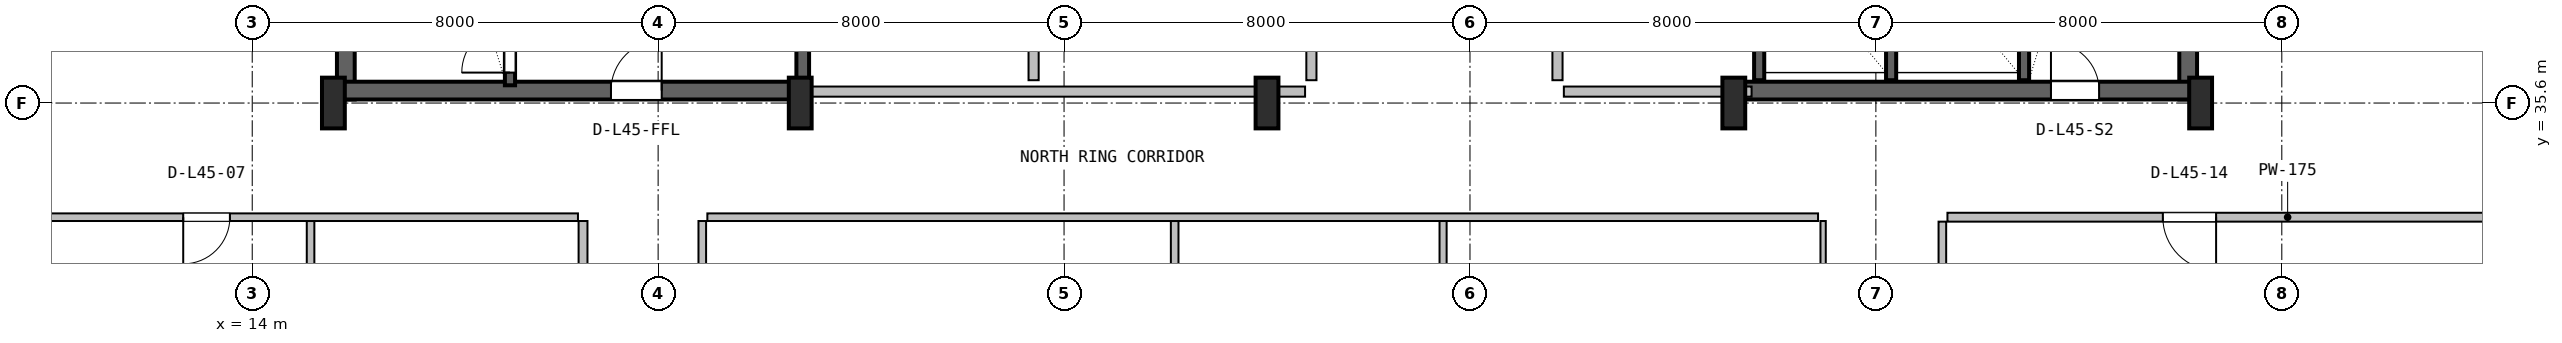
"""IFC4 building model, lengths in metres.
Left out: names, types, materials, properties, quantities, classifications, styles, units other than length and angle.
Written with IfcOpenShell. Run it as: python <this file> out.ifc"""

import sys

from ifc_helpers import new_model, si_unit, direction, frame, frame_2d, origin, origin_2d, place, context, subcontext, project, spatial, rectangle, i_section, extrude, source, transform, mapped, element, fill, save


model = new_model("IFC4")
c1 = context("Model", 3, precision=1e-05, world=origin(), true_north=direction((0.0, 1.0)))
c2 = subcontext(c1, "Body", "Model", "MODEL_VIEW")
j1 = project(units=[si_unit("LENGTHUNIT", "METRE"), si_unit("PLANEANGLEUNIT", "RADIAN")], contexts=[c1])
p1 = place(None, origin())
s1 = spatial("IfcSite", under=j1, at=p1, CompositionType="ELEMENT")
p2 = place(p1, origin())
s2 = spatial("IfcBuilding", under=s1, at=p2, CompositionType="ELEMENT")
p3 = place(p2, frame((0.0, 0.0, 183.8)))
s3 = spatial("IfcBuildingStorey", under=s2, at=p3, CompositionType="ELEMENT", Elevation=183.8)
for number, where, z_axis, x_axis in (
    (1, (15.845, 35.67, 0.0), (0.0, 0.0, 1.0), (0.0, 1.0, 0.0)),
    (2, (52.155, 35.67, 0.0), (0.0, 0.0, 1.0), (0.0, 1.0, 0.0)),
):
    element("IfcWall", number, at=place(p3, frame(where, z_axis=z_axis, x_axis=x_axis)), inside=s3, PredefinedType="SHEAR", context=c2, shape_type="SweptSolid", body=[
        extrude(rectangle(XDim=11.13, YDim=0.35, at=frame_2d((5.565, 0.0))), origin(), (0.0, 0.0, 1.0), 3.55),
    ])
p4 = place(p3, frame((15.67, 35.845, 0.0), z_axis=(0.0, 0.0, 1.0), x_axis=(1.0, 0.0, 0.0)))
e3 = element("IfcWall", 3, at=p4, inside=s3, PredefinedType="SHEAR", context=c2, shape_type="SweptSolid", body=[
    extrude(rectangle(XDim=9.13, YDim=0.35, at=frame_2d((4.565, 0.0))), origin(), (0.0, 0.0, 1.0), 3.55),
])
p5 = place(p4, frame((5.4, 0.0, 0.0)))
e4 = element("IfcOpeningElement", 4, at=p5, cuts=e3, PredefinedType="OPENING", context=c2, shape_type="SweptSolid", body=[
    extrude(rectangle(XDim=1.0, YDim=2.1, at=frame_2d((0.5, 1.05))), frame((0.0, 0.185, 0.0), z_axis=(0.0, -1.0, 0.0), x_axis=(1.0, 0.0, 0.0)), (0.0, 0.0, 1.0), 0.37),
])
p6 = place(p3, frame((43.2, 35.845, 0.0), z_axis=(0.0, 0.0, 1.0), x_axis=(1.0, 0.0, 0.0)))
e5 = element("IfcWall", 5, at=p6, inside=s3, PredefinedType="SHEAR", context=c2, shape_type="SweptSolid", body=[
    extrude(rectangle(XDim=9.13, YDim=0.35, at=frame_2d((4.565, 0.0))), origin(), (0.0, 0.0, 1.0), 3.55),
])
p7 = place(p6, frame((6.25, 0.0, 0.0)))
e6 = element("IfcOpeningElement", 6, at=p7, cuts=e5, PredefinedType="OPENING", context=c2, shape_type="SweptSolid", body=[
    extrude(rectangle(XDim=0.95, YDim=2.1, at=frame_2d((0.475, 1.05))), frame((0.0, 0.185, 0.0), z_axis=(0.0, -1.0, 0.0), x_axis=(1.0, 0.0, 0.0)), (0.0, 0.0, 1.0), 0.37),
])
m1 = source(origin(), c2, "Body", "SweptSolid", [
    extrude(i_section(OverallWidth=0.45, OverallDepth=1.0, WebThickness=0.016, FlangeThickness=0.03, FilletRadius=0.016, at=origin_2d()), origin(), (0.0, 0.0, 1.0), 3.8),
])
for number, where, z_axis, x_axis in (
    (7, (15.6, 35.6, 0.0), (0.0, 0.0, 1.0), (1.0, 0.0, 0.0)),
    (8, (24.8, 35.6, 0.0), (0.0, 0.0, 1.0), (1.0, 0.0, 0.0)),
    (9, (34.0, 35.6, 0.0), (0.0, 0.0, 1.0), (1.0, 0.0, 0.0)),
    (10, (43.2, 35.6, 0.0), (0.0, 0.0, 1.0), (1.0, 0.0, 0.0)),
    (11, (52.4, 35.6, 0.0), (0.0, 0.0, 1.0), (1.0, 0.0, 0.0)),
):
    element("IfcColumn", number, at=place(p3, frame(where, z_axis=z_axis, x_axis=x_axis)), inside=s3, PredefinedType="COLUMN", context=c2, shape_type="MappedRepresentation", body=[
        mapped(m1, transform((0.0, 0.0, 0.0), x_axis=(1.0, 0.0, 0.0), y_axis=(0.0, 1.0, 0.0), z_axis=(0.0, 0.0, 1.0), scale=1.0)),
    ])
p8 = place(p3, frame((19.08, 35.95, 0.0), z_axis=(0.0, 0.0, 1.0), x_axis=(0.0, 1.0, 0.0)))
e12 = element("IfcWall", 12, at=p8, inside=s3, PredefinedType="SHEAR", context=c2, shape_type="SweptSolid", body=[
    extrude(rectangle(XDim=9.65, YDim=0.2, at=frame_2d((4.825, 0.0))), origin(), (0.0, 0.0, 1.0), 3.55),
])
p9 = place(p8, frame((0.25, 0.0, 0.0)))
e13 = element("IfcOpeningElement", 13, at=p9, cuts=e12, PredefinedType="OPENING", context=c2, shape_type="SweptSolid", body=[
    extrude(rectangle(XDim=0.95, YDim=2.1, at=frame_2d((0.475, 1.05))), frame((0.0, 0.11, 0.0), z_axis=(0.0, -1.0, 0.0), x_axis=(1.0, 0.0, 0.0)), (0.0, 0.0, 1.0), 0.22),
])
p10 = place(p3, frame((24.85, 36.05, 0.0), z_axis=(0.0, 0.0, 1.0), x_axis=(0.0, 1.0, 0.0)))
e14 = element("IfcWall", 14, at=p10, inside=s3, PredefinedType="SHEAR", context=c2, shape_type="SweptSolid", body=[
    extrude(rectangle(XDim=10.45, YDim=0.25, at=frame_2d((5.225, 0.0))), origin(), (0.0, 0.0, 1.0), 3.55),
])
p11 = place(p3, frame((48.92, 36.05, 0.0), z_axis=(0.0, 0.0, 1.0), x_axis=(0.0, 1.0, 0.0)))
e15 = element("IfcWall", 15, at=p11, inside=s3, PredefinedType="SHEAR", context=c2, shape_type="SweptSolid", body=[
    extrude(rectangle(XDim=10.5, YDim=0.2, at=frame_2d((5.25, 0.0))), origin(), (0.0, 0.0, 1.0), 3.55),
])
for number, where, z_axis, x_axis in (
    (16, (43.7, 36.05, 0.0), (0.0, 0.0, 1.0), (0.0, 1.0, 0.0)),
    (17, (46.3, 36.05, 0.0), (0.0, 0.0, 1.0), (0.0, 1.0, 0.0)),
):
    element("IfcWall", number, at=place(p3, frame(where, z_axis=z_axis, x_axis=x_axis)), inside=s3, PredefinedType="SHEAR", context=c2, shape_type="SweptSolid", body=[
        extrude(rectangle(XDim=3.05, YDim=0.2, at=frame_2d((1.525, 0.0))), origin(), (0.0, 0.0, 1.0), 3.55),
    ])
p12 = place(p3, frame((25.0, 35.825, 0.0), z_axis=(0.0, 0.0, 1.0), x_axis=(1.0, 0.0, 0.0)))
e18 = element("IfcWall", 18, at=p12, inside=s3, PredefinedType="PLUMBINGWALL", context=c2, shape_type="SweptSolid", body=[
    extrude(rectangle(XDim=9.75, YDim=0.2, at=frame_2d((4.875, 0.0))), origin(), (0.0, 0.0, 1.0), 2.575),
])
for number, where, z_axis, x_axis in (
    (19, (29.4, 36.05, 0.0), (0.0, 0.0, 1.0), (0.0, 1.0, 0.0)),
    (20, (34.875, 36.05, 0.0), (0.0, 0.0, 1.0), (0.0, 1.0, 0.0)),
):
    element("IfcWall", number, at=place(p3, frame(where, z_axis=z_axis, x_axis=x_axis)), inside=s3, PredefinedType="PLUMBINGWALL", context=c2, shape_type="SweptSolid", body=[
        extrude(rectangle(XDim=3.1, YDim=0.2, at=frame_2d((1.55, 0.0))), origin(), (0.0, 0.0, 1.0), 3.53),
    ])
p13 = place(p3, frame((39.85, 35.825, 0.0), z_axis=(0.0, 0.0, 1.0), x_axis=(1.0, 0.0, 0.0)))
e21 = element("IfcWall", 21, at=p13, inside=s3, PredefinedType="SOLIDWALL", context=c2, shape_type="SweptSolid", body=[
    extrude(rectangle(XDim=3.7, YDim=0.2, at=frame_2d((1.85, 0.0))), origin(), (0.0, 0.0, 1.0), 2.575),
])
p14 = place(p3, frame((39.725, 36.05, 0.0), z_axis=(0.0, 0.0, 1.0), x_axis=(0.0, 1.0, 0.0)))
e22 = element("IfcWall", 22, at=p14, inside=s3, PredefinedType="SOLIDWALL", context=c2, shape_type="SweptSolid", body=[
    extrude(rectangle(XDim=3.1, YDim=0.2, at=frame_2d((1.55, 0.0))), origin(), (0.0, 0.0, 1.0), 3.53),
])
p15 = place(p3, frame((15.15, 15.7, 0.0), z_axis=(0.0, 0.0, 1.0), x_axis=(0.0, 1.0, 0.0)))
e23 = element("IfcWall", 23, at=p15, inside=s3, PredefinedType="PARTITIONING", context=c2, shape_type="SweptSolid", body=[
    extrude(rectangle(XDim=17.575, YDim=0.15, at=frame_2d((8.788, 0.0))), origin(), (0.0, 0.0, 1.0), 3.222),
])
p16 = place(p3, frame((7.18, 33.35, 0.0), z_axis=(0.0, 0.0, 1.0), x_axis=(1.0, 0.0, 0.0)))
e24 = element("IfcWall", 24, at=p16, inside=s3, PredefinedType="PARTITIONING", context=c2, shape_type="SweptSolid", body=[
    extrude(rectangle(XDim=13.24, YDim=0.15, at=frame_2d((6.62, 0.0))), origin(), (0.0, 0.0, 1.0), 3.108),
])
p17 = place(p16, frame((5.46, 0.0, 0.0)))
e25 = element("IfcOpeningElement", 25, at=p17, cuts=e24, PredefinedType="OPENING", context=c2, shape_type="SweptSolid", body=[
    extrude(rectangle(XDim=0.92, YDim=2.08, at=frame_2d((0.46, 1.04))), frame((0.0, 0.085, 0.0), z_axis=(0.0, -1.0, 0.0), x_axis=(1.0, 0.0, 0.0)), (0.0, 0.0, 1.0), 0.17),
])
p18 = place(p3, frame((20.52, 15.7, 0.0), z_axis=(0.0, 0.0, 1.0), x_axis=(0.0, 1.0, 0.0)))
e26 = element("IfcWall", 26, at=p18, inside=s3, PredefinedType="PARTITIONING", context=c2, shape_type="SweptSolid", body=[
    extrude(rectangle(XDim=17.575, YDim=0.175, at=frame_2d((8.788, 0.0))), origin(), (0.0, 0.0, 1.0), 3.222),
])
p19 = place(p18, frame((8.265, 0.0, 0.0)))
e27 = element("IfcOpeningElement", 27, at=p19, cuts=e26, PredefinedType="OPENING", context=c2, shape_type="SweptSolid", body=[
    extrude(rectangle(XDim=1.05, YDim=2.1, at=frame_2d((0.525, 1.05))), frame((0.0, 0.098, 0.0), z_axis=(0.0, -1.0, 0.0), x_axis=(1.0, 0.0, 0.0)), (0.0, 0.0, 1.0), 0.195),
])
p20 = place(p3, frame((32.18, 18.055, 0.0), z_axis=(0.0, 0.0, 1.0), x_axis=(0.0, 1.0, 0.0)))
e28 = element("IfcWall", 28, at=p20, inside=s3, PredefinedType="PARTITIONING", context=c2, shape_type="SweptSolid", body=[
    extrude(rectangle(XDim=15.22, YDim=0.15, at=frame_2d((7.61, 0.0))), origin(), (0.0, 0.0, 1.0), 2.909),
])
p21 = place(p3, frame((22.97, 33.35, 0.0), z_axis=(0.0, 0.0, 1.0), x_axis=(1.0, 0.0, 0.0)))
e29 = element("IfcWall", 29, at=p21, inside=s3, PredefinedType="PARTITIONING", context=c2, shape_type="SweptSolid", body=[
    extrude(rectangle(XDim=21.89, YDim=0.15, at=frame_2d((10.945, 0.0))), origin(), (0.0, 0.0, 1.0), 2.909),
])
p22 = place(p3, frame((22.87, 18.055, 0.0), z_axis=(0.0, 0.0, 1.0), x_axis=(0.0, 1.0, 0.0)))
e30 = element("IfcWall", 30, at=p22, inside=s3, PredefinedType="PARTITIONING", context=c2, shape_type="SweptSolid", body=[
    extrude(rectangle(XDim=15.22, YDim=0.15, at=frame_2d((7.61, 0.0))), origin(), (0.0, 0.0, 1.0), 3.222),
])
p23 = place(p22, frame((7.17, 0.0, 0.0)))
e31 = element("IfcOpeningElement", 31, at=p23, cuts=e30, PredefinedType="OPENING", context=c2, shape_type="SweptSolid", body=[
    extrude(rectangle(XDim=0.88, YDim=2.06, at=frame_2d((0.44, 1.03))), frame((0.0, 0.085, 0.0), z_axis=(0.0, -1.0, 0.0), x_axis=(1.0, 0.0, 0.0)), (0.0, 0.0, 1.0), 0.17),
])
p24 = place(p3, frame((37.47, 18.055, 0.0), z_axis=(0.0, 0.0, 1.0), x_axis=(0.0, 1.0, 0.0)))
e32 = element("IfcWall", 32, at=p24, inside=s3, PredefinedType="PARTITIONING", context=c2, shape_type="SweptSolid", body=[
    extrude(rectangle(XDim=15.22, YDim=0.14, at=frame_2d((7.61, 0.0))), origin(), (0.0, 0.0, 1.0), 2.909),
])
p25 = place(p3, frame((44.96, 18.055, 0.0), z_axis=(0.0, 0.0, 1.0), x_axis=(0.0, 1.0, 0.0)))
e33 = element("IfcWall", 33, at=p25, inside=s3, PredefinedType="PARTITIONING", context=c2, shape_type="SweptSolid", body=[
    extrude(rectangle(XDim=15.22, YDim=0.105, at=frame_2d((7.61, 0.0))), origin(), (0.0, 0.0, 1.0), 3.222),
])
p26 = place(p25, frame((7.17, 0.0, 0.0)))
e34 = element("IfcOpeningElement", 34, at=p26, cuts=e33, PredefinedType="OPENING", context=c2, shape_type="SweptSolid", body=[
    extrude(rectangle(XDim=0.88, YDim=2.06, at=frame_2d((0.44, 1.03))), frame((0.0, 0.062, 0.0), z_axis=(0.0, -1.0, 0.0), x_axis=(1.0, 0.0, 0.0)), (0.0, 0.0, 1.0), 0.125),
])
p27 = place(p3, frame((47.31, 15.7, 0.0), z_axis=(0.0, 0.0, 1.0), x_axis=(0.0, 1.0, 0.0)))
e35 = element("IfcWall", 35, at=p27, inside=s3, PredefinedType="PARTITIONING", context=c2, shape_type="SweptSolid", body=[
    extrude(rectangle(XDim=17.563, YDim=0.15, at=frame_2d((8.781, 0.0))), origin(), (0.0, 0.0, 1.0), 3.222),
])
p28 = place(p27, frame((2.44, 0.0, 0.0)))
e36 = element("IfcOpeningElement", 36, at=p28, cuts=e35, PredefinedType="OPENING", context=c2, shape_type="SweptSolid", body=[
    extrude(rectangle(XDim=0.92, YDim=2.08, at=frame_2d((0.46, 1.04))), frame((0.0, 0.085, 0.0), z_axis=(0.0, -1.0, 0.0), x_axis=(1.0, 0.0, 0.0)), (0.0, 0.0, 1.0), 0.17),
])
p29 = place(p27, frame((9.195, 0.0, 0.0)))
e37 = element("IfcOpeningElement", 37, at=p29, cuts=e35, PredefinedType="OPENING", context=c2, shape_type="SweptSolid", body=[
    extrude(rectangle(XDim=0.92, YDim=2.08, at=frame_2d((0.46, 1.04))), frame((0.0, 0.085, 0.0), z_axis=(0.0, -1.0, 0.0), x_axis=(1.0, 0.0, 0.0)), (0.0, 0.0, 1.0), 0.17),
])
p30 = place(p3, frame((47.41, 33.35, 0.0), z_axis=(0.0, 0.0, 1.0), x_axis=(1.0, 0.0, 0.0)))
e38 = element("IfcWall", 38, at=p30, inside=s3, PredefinedType="PARTITIONING", context=c2, shape_type="SweptSolid", body=[
    extrude(rectangle(XDim=13.41, YDim=0.175, at=frame_2d((6.705, 0.0))), origin(), (0.0, 0.0, 1.0), 3.108),
])
p31 = place(p30, frame((4.245, 0.0, 0.0)))
e39 = element("IfcOpeningElement", 39, at=p31, cuts=e38, PredefinedType="OPENING", context=c2, shape_type="SweptSolid", body=[
    extrude(rectangle(XDim=1.05, YDim=2.1, at=frame_2d((0.525, 1.05))), frame((0.0, 0.098, 0.0), z_axis=(0.0, -1.0, 0.0), x_axis=(1.0, 0.0, 0.0)), (0.0, 0.0, 1.0), 0.195),
])
m2 = source(origin(), c2, "Body", "SweptSolid", [
    extrude(rectangle(XDim=0.95, YDim=2.1, at=frame_2d((0.475, 1.05))), frame((0.0, 0.025, 0.0), z_axis=(0.0, -1.0, 0.0), x_axis=(1.0, 0.0, 0.0)), (0.0, 0.0, 1.0), 0.05),
])
p32 = place(p9, origin())
e40 = element("IfcDoor", 40, at=p32, inside=s3, OperationType="SINGLE_SWING_LEFT", PredefinedType="DOOR", context=c2, shape_type="MappedRepresentation", body=[
    mapped(m2, transform((0.0, 0.0, 0.0), x_axis=(1.0, 0.0, 0.0), y_axis=(0.0, 1.0, 0.0), z_axis=(0.0, 0.0, 1.0), scale=1.0)),
])
fill(e13, e40)
m3 = source(origin(), c2, "Body", "SweptSolid", [
    extrude(rectangle(XDim=1.0, YDim=2.1, at=frame_2d((0.5, 1.05))), frame((0.0, 0.025, 0.0), z_axis=(0.0, -1.0, 0.0), x_axis=(1.0, 0.0, 0.0)), (0.0, 0.0, 1.0), 0.05),
])
p33 = place(p5, origin())
e41 = element("IfcDoor", 41, at=p33, inside=s3, OperationType="SINGLE_SWING_RIGHT", PredefinedType="DOOR", context=c2, shape_type="MappedRepresentation", body=[
    mapped(m3, transform((0.0, 0.0, 0.0), x_axis=(1.0, 0.0, 0.0), y_axis=(0.0, 1.0, 0.0), z_axis=(0.0, 0.0, 1.0), scale=1.0)),
])
fill(e4, e41)
p34 = place(p7, origin())
e42 = element("IfcDoor", 42, at=p34, inside=s3, OperationType="SINGLE_SWING_LEFT", PredefinedType="DOOR", context=c2, shape_type="MappedRepresentation", body=[
    mapped(m2, transform((0.0, 0.0, 0.0), x_axis=(1.0, 0.0, 0.0), y_axis=(0.0, 1.0, 0.0), z_axis=(0.0, 0.0, 1.0), scale=1.0)),
])
fill(e6, e42)
m4 = source(origin(), c2, "Body", "SweptSolid", [
    extrude(rectangle(XDim=0.92, YDim=2.08, at=frame_2d((0.46, 1.04))), frame((0.0, 0.025, 0.0), z_axis=(0.0, -1.0, 0.0), x_axis=(1.0, 0.0, 0.0)), (0.0, 0.0, 1.0), 0.05),
])
p35 = place(p17, frame((0.92, 0.0, 0.0), z_axis=(0.0, 0.0, 1.0), x_axis=(-1.0, 0.0, 0.0)))
e43 = element("IfcDoor", 43, at=p35, inside=s3, OperationType="SINGLE_SWING_LEFT", PredefinedType="DOOR", context=c2, shape_type="MappedRepresentation", body=[
    mapped(m4, transform((0.0, 0.0, 0.0), x_axis=(1.0, 0.0, 0.0), y_axis=(0.0, 1.0, 0.0), z_axis=(0.0, 0.0, 1.0), scale=1.0)),
])
fill(e25, e43)
m5 = source(origin(), c2, "Body", "SweptSolid", [
    extrude(rectangle(XDim=1.05, YDim=2.1, at=frame_2d((0.525, 1.05))), frame((0.0, 0.025, 0.0), z_axis=(0.0, -1.0, 0.0), x_axis=(1.0, 0.0, 0.0)), (0.0, 0.0, 1.0), 0.05),
])
p36 = place(p31, frame((1.05, 0.0, 0.0), z_axis=(0.0, 0.0, 1.0), x_axis=(-1.0, 0.0, 0.0)))
e44 = element("IfcDoor", 44, at=p36, inside=s3, OperationType="SINGLE_SWING_RIGHT", PredefinedType="DOOR", context=c2, shape_type="MappedRepresentation", body=[
    mapped(m5, transform((0.0, 0.0, 0.0), x_axis=(1.0, 0.0, 0.0), y_axis=(0.0, 1.0, 0.0), z_axis=(0.0, 0.0, 1.0), scale=1.0)),
])
fill(e39, e44)
save(model, sys.argv[1])
